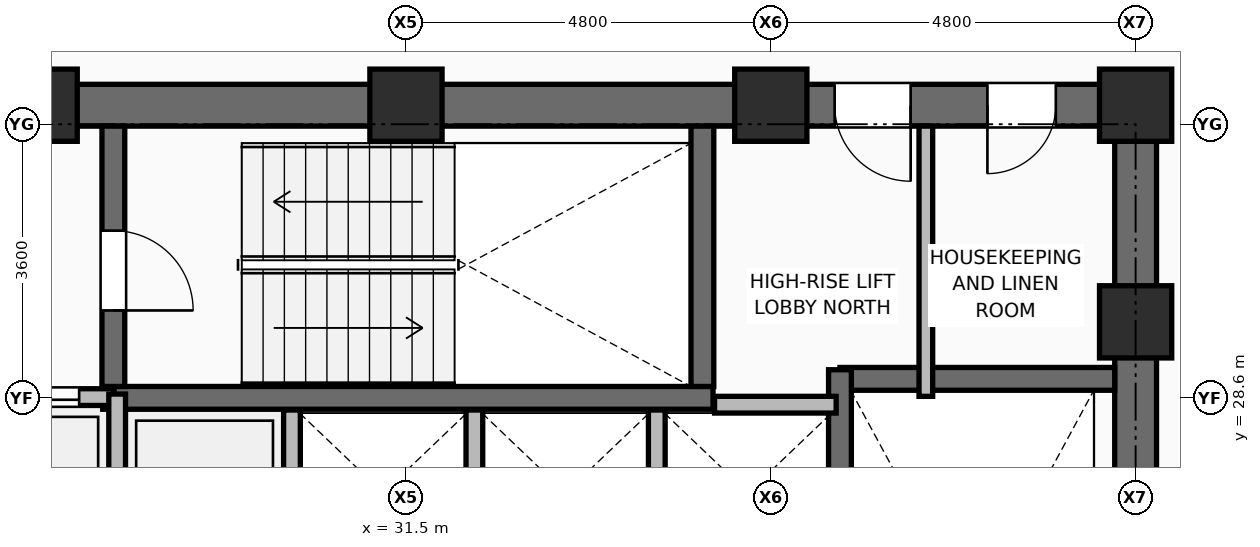
"""IFC4 building model, lengths in metres.
Left out: names, types, materials, properties, quantities, classifications, styles, units other than length and angle.
Written with IfcOpenShell. Run it as: python <this file> out.ifc"""

import sys

from ifc_helpers import new_model, si_unit, direction, frame, frame_2d, origin, origin_2d, place, context, subcontext, project, spatial, rectangle, extrude, element, fill, save


model = new_model("IFC4")
c1 = context("Model", 3, precision=1e-05, world=origin(), true_north=direction((0.0, 1.0)))
c2 = subcontext(c1, "Body", "Model", "MODEL_VIEW")
j1 = project(units=[si_unit("LENGTHUNIT", "METRE"), si_unit("PLANEANGLEUNIT", "RADIAN")], contexts=[c1])
p1 = place(None, origin())
s1 = spatial("IfcSite", under=j1, at=p1, CompositionType="ELEMENT")
p2 = place(p1, origin())
s2 = spatial("IfcBuilding", under=s1, at=p2, CompositionType="ELEMENT")
p3 = place(p2, frame((0.0, 0.0, 149.7)))
s3 = spatial("IfcBuildingStorey", under=s2, at=p3, CompositionType="ELEMENT", Elevation=149.7)
for number, where, z_axis, x_axis in (
    (1, (41.1, 29.6, 0.0), (0.0, 0.0, 1.0), (1.0, 0.0, 0.0)),
    (2, (26.7, 32.45, 0.0), (0.0, 0.0, 1.0), (1.0, 0.0, 0.0)),
    (3, (31.5, 32.45, 0.0), (0.0, 0.0, 1.0), (1.0, 0.0, 0.0)),
    (4, (36.3, 32.45, 0.0), (0.0, 0.0, 1.0), (1.0, 0.0, 0.0)),
    (5, (41.1, 32.45, 0.0), (0.0, 0.0, 1.0), (1.0, 0.0, 0.0)),
):
    element("IfcColumn", number, at=place(p3, frame(where, z_axis=z_axis, x_axis=x_axis)), inside=s3, PredefinedType="COLUMN", context=c2, shape_type="SweptSolid", body=[
        extrude(rectangle(XDim=0.95, YDim=0.95, at=origin_2d()), origin(), (0.0, 0.0, 1.0), 3.75),
    ])
p4 = place(p3, frame((30.0, 25.71, 0.0), z_axis=(0.0, 0.0, 1.0), x_axis=(0.0, 1.0, 0.0)))
e6 = element("IfcWall", 6, at=p4, inside=s3, PredefinedType="PARTITIONING", context=c2, shape_type="SweptSolid", body=[
    extrude(rectangle(XDim=2.73, YDim=0.22, at=frame_2d((1.365, 0.0))), origin(), (0.0, 0.0, 1.0), 3.545),
])
p5 = place(p3, frame((32.4, 26.2, 0.0), z_axis=(0.0, 0.0, 1.0), x_axis=(0.0, 1.0, 0.0)))
e7 = element("IfcWall", 7, at=p5, inside=s3, PredefinedType="PARTITIONING", context=c2, shape_type="SweptSolid", body=[
    extrude(rectangle(XDim=2.24, YDim=0.22, at=frame_2d((1.12, 0.0))), origin(), (0.0, 0.0, 1.0), 3.545),
])
p6 = place(p3, frame((34.8, 26.23, 0.0), z_axis=(0.0, 0.0, 1.0), x_axis=(0.0, 1.0, 0.0)))
e8 = element("IfcWall", 8, at=p6, inside=s3, PredefinedType="PARTITIONING", context=c2, shape_type="SweptSolid", body=[
    extrude(rectangle(XDim=2.21, YDim=0.22, at=frame_2d((1.105, 0.0))), origin(), (0.0, 0.0, 1.0), 3.545),
])
p7 = place(p3, frame((21.625, 32.45, 0.0), z_axis=(0.0, 0.0, 1.0), x_axis=(1.0, 0.0, 0.0)))
e9 = element("IfcWall", 9, at=p7, inside=s3, PredefinedType="SHEAR", context=c2, shape_type="SweptSolid", body=[
    extrude(rectangle(XDim=19.75, YDim=0.55, at=frame_2d((9.875, 0.0))), origin(), (0.0, 0.0, 1.0), 3.57),
])
p8 = place(p7, frame((2.125, 0.0, 0.0)))
e10 = element("IfcOpeningElement", 10, at=p8, cuts=e9, PredefinedType="OPENING", context=c2, shape_type="SweptSolid", body=[
    extrude(rectangle(XDim=1.1, YDim=2.1, at=frame_2d((0.55, 1.05))), frame((0.0, 0.285, 0.0), z_axis=(0.0, -1.0, 0.0), x_axis=(1.0, 0.0, 0.0)), (0.0, 0.0, 1.0), 0.57),
])
p9 = place(p7, frame((15.515, 0.0, 0.0)))
e11 = element("IfcOpeningElement", 11, at=p9, cuts=e9, PredefinedType="OPENING", context=c2, shape_type="SweptSolid", body=[
    extrude(rectangle(XDim=1.0, YDim=2.1, at=frame_2d((0.5, 1.05))), frame((0.0, 0.285, 0.0), z_axis=(0.0, -1.0, 0.0), x_axis=(1.0, 0.0, 0.0)), (0.0, 0.0, 1.0), 0.57),
])
p10 = place(p7, frame((17.525, 0.0, 0.0)))
e12 = element("IfcOpeningElement", 12, at=p10, cuts=e9, PredefinedType="OPENING", context=c2, shape_type="SweptSolid", body=[
    extrude(rectangle(XDim=0.9, YDim=2.1, at=frame_2d((0.45, 1.05))), frame((0.0, 0.285, 0.0), z_axis=(0.0, -1.0, 0.0), x_axis=(1.0, 0.0, 0.0)), (0.0, 0.0, 1.0), 0.57),
])
p11 = place(p3, frame((41.1, 18.075, 0.0), z_axis=(0.0, 0.0, 1.0), x_axis=(0.0, 1.0, 0.0)))
e13 = element("IfcWall", 13, at=p11, inside=s3, PredefinedType="SHEAR", context=c2, shape_type="SweptSolid", body=[
    extrude(rectangle(XDim=14.1, YDim=0.55, at=frame_2d((7.05, 0.0))), origin(), (0.0, 0.0, 1.0), 3.57),
])
p12 = place(p11, frame((3.385, 0.0, 0.0)))
e14 = element("IfcOpeningElement", 14, at=p12, cuts=e13, PredefinedType="OPENING", context=c2, shape_type="SweptSolid", body=[
    extrude(rectangle(XDim=1.05, YDim=2.1, at=frame_2d((0.525, 1.05))), frame((0.0, 0.285, 0.0), z_axis=(0.0, -1.0, 0.0), x_axis=(1.0, 0.0, 0.0)), (0.0, 0.0, 1.0), 0.57),
])
p13 = place(p3, frame((37.21, 28.85, 0.0), z_axis=(0.0, 0.0, 1.0), x_axis=(1.0, 0.0, 0.0)))
e15 = element("IfcWall", 15, at=p13, inside=s3, PredefinedType="SHEAR", context=c2, shape_type="SweptSolid", body=[
    extrude(rectangle(XDim=3.615, YDim=0.3, at=frame_2d((1.808, 0.0))), origin(), (0.0, 0.0, 1.0), 3.57),
])
p14 = place(p3, frame((37.21, 20.98, 0.0), z_axis=(0.0, 0.0, 1.0), x_axis=(0.0, 1.0, 0.0)))
e16 = element("IfcWall", 16, at=p14, inside=s3, PredefinedType="SHEAR", context=c2, shape_type="SweptSolid", body=[
    extrude(rectangle(XDim=7.99, YDim=0.3, at=frame_2d((3.995, 0.0))), origin(), (0.0, 0.0, 1.0), 3.57),
])
p15 = place(p3, frame((27.51, 28.6, 0.0), z_axis=(0.0, 0.0, 1.0), x_axis=(1.0, 0.0, 0.0)))
e17 = element("IfcWall", 17, at=p15, inside=s3, PredefinedType="SHEAR", context=c2, shape_type="SweptSolid", body=[
    extrude(rectangle(XDim=8.03, YDim=0.3, at=frame_2d((4.015, 0.0))), origin(), (0.0, 0.0, 1.0), 3.57),
])
p16 = place(p3, frame((27.65, 28.75, 0.0), z_axis=(0.0, 0.0, 1.0), x_axis=(0.0, 1.0, 0.0)))
e18 = element("IfcWall", 18, at=p16, inside=s3, PredefinedType="SHEAR", context=c2, shape_type="SweptSolid", body=[
    extrude(rectangle(XDim=3.425, YDim=0.3, at=frame_2d((1.712, 0.0))), origin(), (0.0, 0.0, 1.0), 3.57),
])
p17 = place(p16, frame((1.0, 0.0, 0.0)))
e19 = element("IfcOpeningElement", 19, at=p17, cuts=e18, PredefinedType="OPENING", context=c2, shape_type="SweptSolid", body=[
    extrude(rectangle(XDim=1.05, YDim=2.1, at=frame_2d((0.525, 1.05))), frame((0.0, 0.16, 0.0), z_axis=(0.0, -1.0, 0.0), x_axis=(1.0, 0.0, 0.0)), (0.0, 0.0, 1.0), 0.32),
])
p18 = place(p3, frame((35.4, 28.75, 0.0), z_axis=(0.0, 0.0, 1.0), x_axis=(0.0, 1.0, 0.0)))
e20 = element("IfcWall", 20, at=p18, inside=s3, PredefinedType="SHEAR", context=c2, shape_type="SweptSolid", body=[
    extrude(rectangle(XDim=3.425, YDim=0.3, at=frame_2d((1.712, 0.0))), origin(), (0.0, 0.0, 1.0), 3.57),
])
p19 = place(p3, frame((25.64, 28.61, 0.0), z_axis=(0.0, 0.0, 1.0), x_axis=(1.0, 0.0, 0.0)))
e21 = element("IfcWall", 21, at=p19, inside=s3, PredefinedType="PARTITIONING", context=c2, shape_type="SweptSolid", body=[
    extrude(rectangle(XDim=2.02, YDim=0.22, at=frame_2d((1.01, 0.0))), origin(), (0.0, 0.0, 1.0), 3.55),
])
p20 = place(p19, frame((0.46, 0.0, 0.0)))
e22 = element("IfcOpeningElement", 22, at=p20, cuts=e21, PredefinedType="OPENING", context=c2, shape_type="SweptSolid", body=[
    extrude(rectangle(XDim=1.1, YDim=2.2, at=frame_2d((0.55, 1.1))), frame((0.0, 0.12, 0.0), z_axis=(0.0, -1.0, 0.0), x_axis=(1.0, 0.0, 0.0)), (0.0, 0.0, 1.0), 0.24),
])
p21 = place(p3, frame((35.56, 28.51, 0.0), z_axis=(0.0, 0.0, 1.0), x_axis=(1.0, 0.0, 0.0)))
e23 = element("IfcWall", 23, at=p21, inside=s3, PredefinedType="PARTITIONING", context=c2, shape_type="SweptSolid", body=[
    extrude(rectangle(XDim=1.6, YDim=0.22, at=frame_2d((0.8, 0.0))), origin(), (0.0, 0.0, 1.0), 3.55),
])
p22 = place(p3, frame((27.7, 25.65, 0.0), z_axis=(0.0, 0.0, 1.0), x_axis=(0.0, 1.0, 0.0)))
e24 = element("IfcWall", 24, at=p22, inside=s3, PredefinedType="PARTITIONING", context=c2, shape_type="SweptSolid", body=[
    extrude(rectangle(XDim=3.0, YDim=0.22, at=frame_2d((1.5, 0.0))), origin(), (0.0, 0.0, 1.0), 3.55),
])
p23 = place(p3, frame((38.34, 28.62, 0.0), z_axis=(0.0, 0.0, 1.0), x_axis=(0.0, 1.0, 0.0)))
e25 = element("IfcWall", 25, at=p23, inside=s3, PredefinedType="PARTITIONING", context=c2, shape_type="SweptSolid", body=[
    extrude(rectangle(XDim=3.555, YDim=0.18, at=frame_2d((1.777, 0.0))), origin(), (0.0, 0.0, 1.0), 3.55),
])
p24 = place(p17, frame((1.05, 0.0, 0.0), z_axis=(0.0, 0.0, 1.0), x_axis=(-1.0, 0.0, 0.0)))
e26 = element("IfcDoor", 26, at=p24, inside=s3, OperationType="SINGLE_SWING_RIGHT", PredefinedType="DOOR", context=c2, shape_type="SweptSolid", body=[
    extrude(rectangle(XDim=1.05, YDim=2.1, at=frame_2d((0.525, 1.05))), frame((0.0, 0.025, 0.0), z_axis=(0.0, -1.0, 0.0), x_axis=(1.0, 0.0, 0.0)), (0.0, 0.0, 1.0), 0.05),
])
fill(e19, e26)
p25 = place(p20, origin())
e27 = element("IfcDoor", 27, at=p25, inside=s3, OperationType="DOUBLE_DOOR_SLIDING", PredefinedType="DOOR", context=c2, shape_type="SweptSolid", body=[
    extrude(rectangle(XDim=1.1, YDim=2.2, at=frame_2d((0.55, 1.1))), frame((0.0, 0.025, 0.0), z_axis=(0.0, -1.0, 0.0), x_axis=(1.0, 0.0, 0.0)), (0.0, 0.0, 1.0), 0.05),
])
fill(e22, e27)
p26 = place(p9, frame((1.0, 0.0, 0.0), z_axis=(0.0, 0.0, 1.0), x_axis=(-1.0, 0.0, 0.0)))
e28 = element("IfcDoor", 28, at=p26, inside=s3, OperationType="SINGLE_SWING_LEFT", PredefinedType="DOOR", context=c2, shape_type="SweptSolid", body=[
    extrude(rectangle(XDim=1.0, YDim=2.1, at=frame_2d((0.5, 1.05))), frame((0.0, 0.025, 0.0), z_axis=(0.0, -1.0, 0.0), x_axis=(1.0, 0.0, 0.0)), (0.0, 0.0, 1.0), 0.05),
])
fill(e11, e28)
p27 = place(p10, frame((0.9, 0.0, 0.0), z_axis=(0.0, 0.0, 1.0), x_axis=(-1.0, 0.0, 0.0)))
e29 = element("IfcDoor", 29, at=p27, inside=s3, OperationType="SINGLE_SWING_RIGHT", PredefinedType="DOOR", context=c2, shape_type="SweptSolid", body=[
    extrude(rectangle(XDim=0.9, YDim=2.1, at=frame_2d((0.45, 1.05))), frame((0.0, 0.025, 0.0), z_axis=(0.0, -1.0, 0.0), x_axis=(1.0, 0.0, 0.0)), (0.0, 0.0, 1.0), 0.05),
])
fill(e12, e29)
save(model, sys.argv[1])
